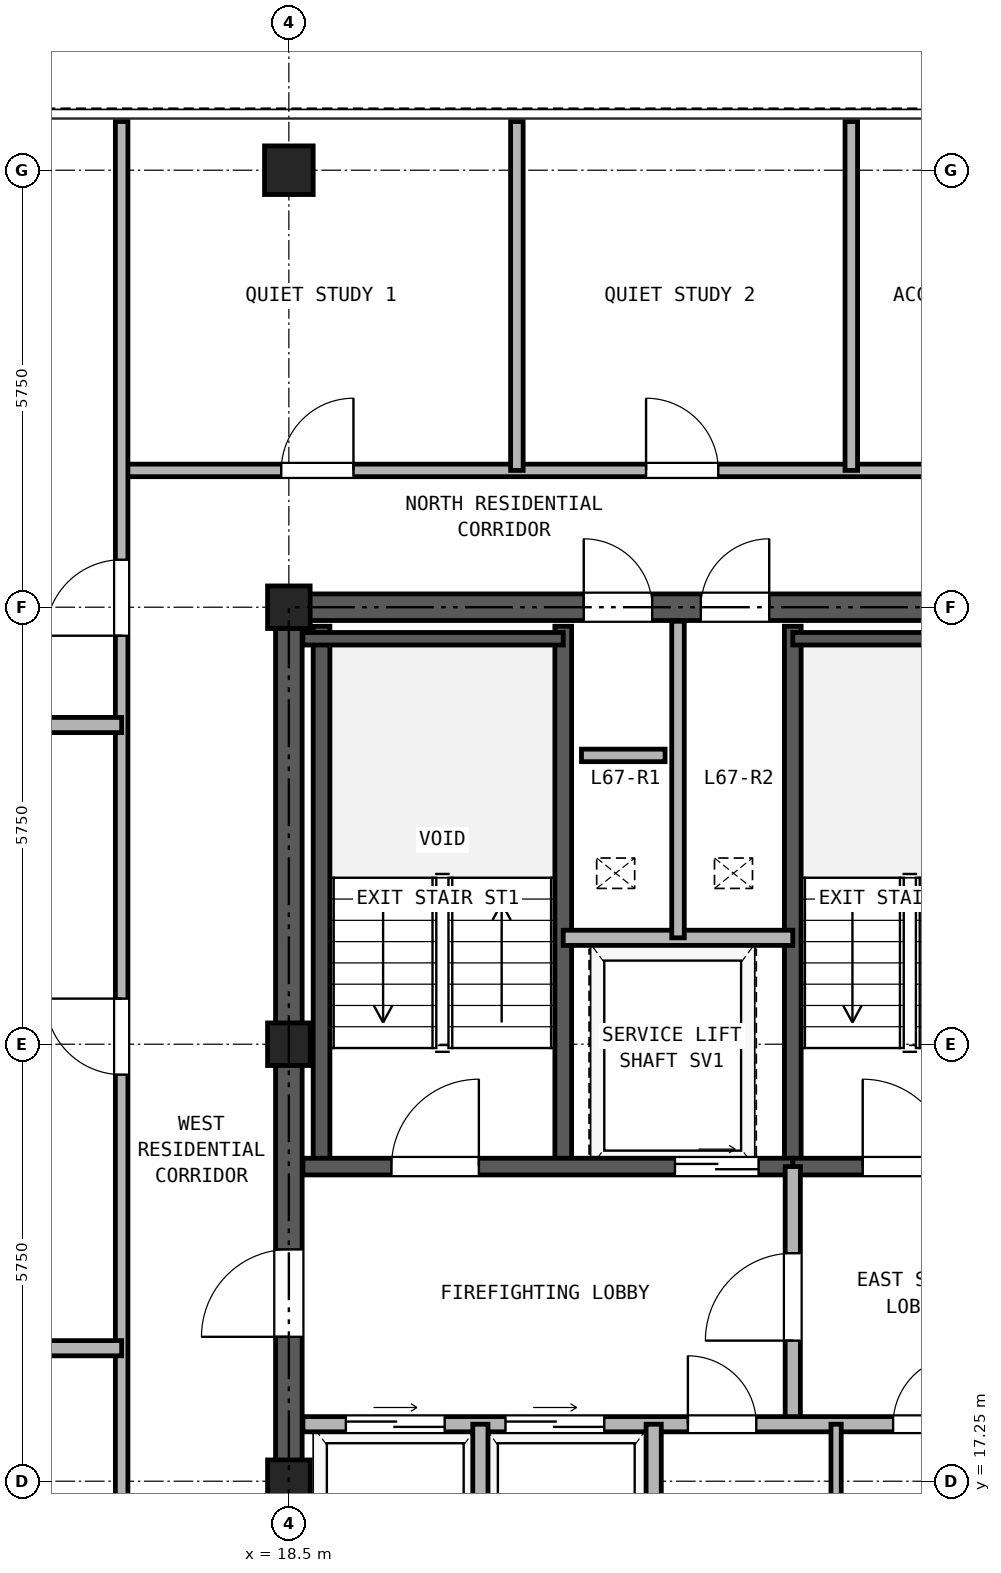
"""IFC4 building model, lengths in metres.
Left out: names, types, materials, properties, quantities, classifications, styles, units other than length and angle.
Written with IfcOpenShell. Run it as: python <this file> out.ifc"""

import sys

from ifc_helpers import new_model, si_unit, direction, frame, frame_2d, origin, origin_2d, place, context, subcontext, project, spatial, rectangle, hollow_rectangle, extrude, source, transform, mapped, element, fill, save


model = new_model("IFC4")
c1 = context("Model", 3, precision=1e-05, world=origin(), true_north=direction((0.0, 1.0)))
c2 = subcontext(c1, "Body", "Model", "MODEL_VIEW")
j1 = project(units=[si_unit("LENGTHUNIT", "METRE"), si_unit("PLANEANGLEUNIT", "RADIAN")], contexts=[c1])
p1 = place(None, origin())
s1 = spatial("IfcSite", under=j1, at=p1, CompositionType="ELEMENT")
p2 = place(p1, origin())
s2 = spatial("IfcBuilding", under=s1, at=p2, CompositionType="ELEMENT")
p3 = place(p2, frame((0.0, 0.0, 236.1)))
s3 = spatial("IfcBuildingStorey", under=s2, at=p3, CompositionType="ELEMENT", Elevation=236.1)
m1 = source(origin(), c2, "Body", "SweptSolid", [
    extrude(hollow_rectangle(XDim=0.64, YDim=0.64, WallThickness=0.035, at=origin_2d()), origin(), (0.0, 0.0, 1.0), 2.98),
])
p4 = place(p3, frame((18.5, 34.5, 0.0), z_axis=(0.0, 0.0, 1.0), x_axis=(1.0, 0.0, 0.0)))
e1 = element("IfcColumn", 1, at=p4, inside=s3, PredefinedType="COLUMN", context=c2, shape_type="MappedRepresentation", body=[
    mapped(m1, transform((0.0, 0.0, 0.0), x_axis=(1.0, 0.0, 0.0), y_axis=(0.0, 1.0, 0.0), z_axis=(0.0, 0.0, 1.0), scale=1.0)),
])
m2 = source(origin(), c2, "Body", "SweptSolid", [
    extrude(hollow_rectangle(XDim=0.56, YDim=0.56, WallThickness=0.03, at=origin_2d()), origin(), (0.0, 0.0, 1.0), 2.98),
])
for number, where, z_axis, x_axis in (
    (2, (18.5, 17.25, 0.0), (0.0, 0.0, 1.0), (1.0, 0.0, 0.0)),
    (3, (18.5, 23.0, 0.0), (0.0, 0.0, 1.0), (1.0, 0.0, 0.0)),
    (4, (18.5, 28.75, 0.0), (0.0, 0.0, 1.0), (1.0, 0.0, 0.0)),
):
    element("IfcColumn", number, at=place(p3, frame(where, z_axis=z_axis, x_axis=x_axis)), inside=s3, PredefinedType="COLUMN", context=c2, shape_type="MappedRepresentation", body=[
        mapped(m2, transform((0.0, 0.0, 0.0), x_axis=(1.0, 0.0, 0.0), y_axis=(0.0, 1.0, 0.0), z_axis=(0.0, 0.0, 1.0), scale=1.0)),
    ])
p5 = place(p3, frame((18.325, 28.75, 0.0), z_axis=(0.0, 0.0, 1.0), x_axis=(1.0, 0.0, 0.0)))
e5 = element("IfcWall", 5, at=p5, inside=s3, PredefinedType="SHEAR", context=c2, shape_type="SweptSolid", body=[
    extrude(rectangle(XDim=10.35, YDim=0.35, at=frame_2d((5.175, 0.0))), origin(), (0.0, 0.0, 1.0), 2.98),
])
p6 = place(p5, frame((4.055, 0.0, 0.0)))
e6 = element("IfcOpeningElement", 6, at=p6, cuts=e5, PredefinedType="OPENING", context=c2, shape_type="SweptSolid", body=[
    extrude(rectangle(XDim=0.9, YDim=2.05, at=frame_2d((0.45, 1.025))), frame((0.0, 0.185, 0.0), z_axis=(0.0, -1.0, 0.0), x_axis=(1.0, 0.0, 0.0)), (0.0, 0.0, 1.0), 0.37),
])
p7 = place(p5, frame((5.595, 0.0, 0.0)))
e7 = element("IfcOpeningElement", 7, at=p7, cuts=e5, PredefinedType="OPENING", context=c2, shape_type="SweptSolid", body=[
    extrude(rectangle(XDim=0.9, YDim=2.05, at=frame_2d((0.45, 1.025))), frame((0.0, 0.185, 0.0), z_axis=(0.0, -1.0, 0.0), x_axis=(1.0, 0.0, 0.0)), (0.0, 0.0, 1.0), 0.37),
])
p8 = place(p3, frame((18.5, 11.675, 0.0), z_axis=(0.0, 0.0, 1.0), x_axis=(0.0, 1.0, 0.0)))
e8 = element("IfcWall", 8, at=p8, inside=s3, PredefinedType="SHEAR", context=c2, shape_type="SweptSolid", body=[
    extrude(rectangle(XDim=16.9, YDim=0.35, at=frame_2d((8.45, 0.0))), origin(), (0.0, 0.0, 1.0), 2.98),
])
p9 = place(p8, frame((7.475, 0.0, 0.0)))
e9 = element("IfcOpeningElement", 9, at=p9, cuts=e8, PredefinedType="OPENING", context=c2, shape_type="SweptSolid", body=[
    extrude(rectangle(XDim=1.15, YDim=2.2, at=frame_2d((0.575, 1.1))), frame((0.0, 0.185, 0.0), z_axis=(0.0, -1.0, 0.0), x_axis=(1.0, 0.0, 0.0)), (0.0, 0.0, 1.0), 0.37),
])
for number, where, z_axis, x_axis in (
    (10, (18.93, 21.39, 0.0), (0.0, 0.0, 1.0), (0.0, 1.0, 0.0)),
    (11, (22.11, 21.39, 0.0), (0.0, 0.0, 1.0), (0.0, 1.0, 0.0)),
    (12, (25.13, 21.39, 0.0), (0.0, 0.0, 1.0), (0.0, 1.0, 0.0)),
):
    element("IfcWall", number, at=place(p3, frame(where, z_axis=z_axis, x_axis=x_axis)), inside=s3, PredefinedType="SOLIDWALL", context=c2, shape_type="SweptSolid", body=[
        extrude(rectangle(XDim=7.11, YDim=0.22, at=frame_2d((3.555, 0.0))), origin(), (0.0, 0.0, 1.0), 2.98),
    ])
p10 = place(p3, frame((18.685, 28.335, 0.0), z_axis=(0.0, 0.0, 1.0), x_axis=(1.0, 0.0, 0.0)))
e13 = element("IfcWall", 13, at=p10, inside=s3, PredefinedType="PARTITIONING", context=c2, shape_type="SweptSolid", body=[
    extrude(rectangle(XDim=3.425, YDim=0.165, at=frame_2d((1.712, 0.0))), origin(), (0.0, 0.0, 1.0), 2.98),
])
p11 = place(p3, frame((25.13, 28.335, 0.0), z_axis=(0.0, 0.0, 1.0), x_axis=(1.0, 0.0, 0.0)))
e14 = element("IfcWall", 14, at=p11, inside=s3, PredefinedType="PARTITIONING", context=c2, shape_type="SweptSolid", body=[
    extrude(rectangle(XDim=3.185, YDim=0.165, at=frame_2d((1.593, 0.0))), origin(), (0.0, 0.0, 1.0), 2.98),
])
p12 = place(p3, frame((18.685, 21.39, 0.0), z_axis=(0.0, 0.0, 1.0), x_axis=(1.0, 0.0, 0.0)))
e15 = element("IfcWall", 15, at=p12, inside=s3, PredefinedType="SOLIDWALL", context=c2, shape_type="SweptSolid", body=[
    extrude(rectangle(XDim=6.445, YDim=0.22, at=frame_2d((3.222, 0.0))), origin(), (0.0, 0.0, 1.0), 2.98),
])
p13 = place(p12, frame((1.165, 0.0, 0.0)))
e16 = element("IfcOpeningElement", 16, at=p13, cuts=e15, PredefinedType="OPENING", context=c2, shape_type="SweptSolid", body=[
    extrude(rectangle(XDim=1.15, YDim=2.2, at=frame_2d((0.575, 1.1))), frame((0.0, 0.12, 0.0), z_axis=(0.0, -1.0, 0.0), x_axis=(1.0, 0.0, 0.0)), (0.0, 0.0, 1.0), 0.24),
])
p14 = place(p12, frame((4.895, 0.0, 0.0)))
e17 = element("IfcOpeningElement", 17, at=p14, cuts=e15, PredefinedType="OPENING", context=c2, shape_type="SweptSolid", body=[
    extrude(rectangle(XDim=1.1, YDim=2.25, at=frame_2d((0.55, 1.125))), frame((0.0, 0.12, 0.0), z_axis=(0.0, -1.0, 0.0), x_axis=(1.0, 0.0, 0.0)), (0.0, 0.0, 1.0), 0.24),
])
p15 = place(p3, frame((25.13, 21.39, 0.0), z_axis=(0.0, 0.0, 1.0), x_axis=(1.0, 0.0, 0.0)))
e18 = element("IfcWall", 18, at=p15, inside=s3, PredefinedType="SOLIDWALL", context=c2, shape_type="SweptSolid", body=[
    extrude(rectangle(XDim=3.185, YDim=0.22, at=frame_2d((1.593, 0.0))), origin(), (0.0, 0.0, 1.0), 2.98),
])
p16 = place(p15, frame((0.92, 0.0, 0.0)))
e19 = element("IfcOpeningElement", 19, at=p16, cuts=e18, PredefinedType="OPENING", context=c2, shape_type="SweptSolid", body=[
    extrude(rectangle(XDim=1.15, YDim=2.2, at=frame_2d((0.575, 1.1))), frame((0.0, 0.12, 0.0), z_axis=(0.0, -1.0, 0.0), x_axis=(1.0, 0.0, 0.0)), (0.0, 0.0, 1.0), 0.24),
])
p17 = place(p3, frame((22.11, 24.4, 0.0), z_axis=(0.0, 0.0, 1.0), x_axis=(1.0, 0.0, 0.0)))
e20 = element("IfcWall", 20, at=p17, inside=s3, PredefinedType="PARTITIONING", context=c2, shape_type="SweptSolid", body=[
    extrude(rectangle(XDim=3.02, YDim=0.2, at=frame_2d((1.51, 0.0))), origin(), (0.0, 0.0, 1.0), 2.98),
])
p18 = place(p3, frame((23.62, 24.4, 0.0), z_axis=(0.0, 0.0, 1.0), x_axis=(0.0, 1.0, 0.0)))
e21 = element("IfcWall", 21, at=p18, inside=s3, PredefinedType="PARTITIONING", context=c2, shape_type="SweptSolid", body=[
    extrude(rectangle(XDim=4.165, YDim=0.165, at=frame_2d((2.083, 0.0))), origin(), (0.0, 0.0, 1.0), 2.98),
])
p19 = place(p3, frame((25.13, 18.0, 0.0), z_axis=(0.0, 0.0, 1.0), x_axis=(0.0, 1.0, 0.0)))
e22 = element("IfcWall", 22, at=p19, inside=s3, PredefinedType="PARTITIONING", context=c2, shape_type="SweptSolid", body=[
    extrude(rectangle(XDim=3.39, YDim=0.2, at=frame_2d((1.695, 0.0))), origin(), (0.0, 0.0, 1.0), 2.98),
])
p20 = place(p19, frame((1.1, 0.0, 0.0)))
e23 = element("IfcOpeningElement", 23, at=p20, cuts=e22, PredefinedType="OPENING", context=c2, shape_type="SweptSolid", body=[
    extrude(rectangle(XDim=1.15, YDim=2.2, at=frame_2d((0.575, 1.1))), frame((0.0, 0.11, 0.0), z_axis=(0.0, -1.0, 0.0), x_axis=(1.0, 0.0, 0.0)), (0.0, 0.0, 1.0), 0.22),
])
p21 = place(p3, frame((18.685, 18.0, 0.0), z_axis=(0.0, 0.0, 1.0), x_axis=(1.0, 0.0, 0.0)))
e24 = element("IfcWall", 24, at=p21, inside=s3, PredefinedType="PARTITIONING", context=c2, shape_type="SweptSolid", body=[
    extrude(rectangle(XDim=9.63, YDim=0.2, at=frame_2d((4.815, 0.0))), origin(), (0.0, 0.0, 1.0), 2.98),
])
p22 = place(p21, frame((0.565, 0.0, 0.0)))
e25 = element("IfcOpeningElement", 25, at=p22, cuts=e24, PredefinedType="OPENING", context=c2, shape_type="SweptSolid", body=[
    extrude(rectangle(XDim=1.3, YDim=2.3, at=frame_2d((0.65, 1.15))), frame((0.0, 0.11, 0.0), z_axis=(0.0, -1.0, 0.0), x_axis=(1.0, 0.0, 0.0)), (0.0, 0.0, 1.0), 0.22),
])
p23 = place(p21, frame((2.665, 0.0, 0.0)))
e26 = element("IfcOpeningElement", 26, at=p23, cuts=e24, PredefinedType="OPENING", context=c2, shape_type="SweptSolid", body=[
    extrude(rectangle(XDim=1.3, YDim=2.3, at=frame_2d((0.65, 1.15))), frame((0.0, 0.11, 0.0), z_axis=(0.0, -1.0, 0.0), x_axis=(1.0, 0.0, 0.0)), (0.0, 0.0, 1.0), 0.22),
])
p24 = place(p21, frame((5.065, 0.0, 0.0)))
e27 = element("IfcOpeningElement", 27, at=p24, cuts=e24, PredefinedType="OPENING", context=c2, shape_type="SweptSolid", body=[
    extrude(rectangle(XDim=0.9, YDim=2.05, at=frame_2d((0.45, 1.025))), frame((0.0, 0.11, 0.0), z_axis=(0.0, -1.0, 0.0), x_axis=(1.0, 0.0, 0.0)), (0.0, 0.0, 1.0), 0.22),
])
p25 = place(p21, frame((7.765, 0.0, 0.0)))
e28 = element("IfcOpeningElement", 28, at=p25, cuts=e24, PredefinedType="OPENING", context=c2, shape_type="SweptSolid", body=[
    extrude(rectangle(XDim=0.9, YDim=2.05, at=frame_2d((0.45, 1.025))), frame((0.0, 0.11, 0.0), z_axis=(0.0, -1.0, 0.0), x_axis=(1.0, 0.0, 0.0)), (0.0, 0.0, 1.0), 0.22),
])
for number, where, z_axis, x_axis in (
    (29, (21.02, 15.0, 0.0), (0.0, 0.0, 1.0), (0.0, 1.0, 0.0)),
    (30, (23.3, 15.0, 0.0), (0.0, 0.0, 1.0), (0.0, 1.0, 0.0)),
):
    element("IfcWall", number, at=place(p3, frame(where, z_axis=z_axis, x_axis=x_axis)), inside=s3, PredefinedType="PARTITIONING", context=c2, shape_type="SweptSolid", body=[
        extrude(rectangle(XDim=3.0, YDim=0.2, at=frame_2d((1.5, 0.0))), origin(), (0.0, 0.0, 1.0), 2.98),
    ])
p26 = place(p3, frame((25.7, 15.0, 0.0), z_axis=(0.0, 0.0, 1.0), x_axis=(0.0, 1.0, 0.0)))
e31 = element("IfcWall", 31, at=p26, inside=s3, PredefinedType="PARTITIONING", context=c2, shape_type="SweptSolid", body=[
    extrude(rectangle(XDim=3.0, YDim=0.135, at=frame_2d((1.5, 0.0))), origin(), (0.0, 0.0, 1.0), 2.98),
])
p27 = place(p3, frame((16.3, 30.55, 0.0), z_axis=(0.0, 0.0, 1.0), x_axis=(1.0, 0.0, 0.0)))
e32 = element("IfcWall", 32, at=p27, inside=s3, PredefinedType="PARTITIONING", context=c2, shape_type="SweptSolid", body=[
    extrude(rectangle(XDim=14.4, YDim=0.165, at=frame_2d((7.2, 0.0))), origin(), (0.0, 0.0, 1.0), 2.98),
])
p28 = place(p27, frame((2.1, 0.0, 0.0)))
e33 = element("IfcOpeningElement", 33, at=p28, cuts=e32, PredefinedType="OPENING", context=c2, shape_type="SweptSolid", body=[
    extrude(rectangle(XDim=0.95, YDim=2.15, at=frame_2d((0.475, 1.075))), frame((0.0, 0.093, 0.0), z_axis=(0.0, -1.0, 0.0), x_axis=(1.0, 0.0, 0.0)), (0.0, 0.0, 1.0), 0.185),
])
p29 = place(p27, frame((6.9, 0.0, 0.0)))
e34 = element("IfcOpeningElement", 34, at=p29, cuts=e32, PredefinedType="OPENING", context=c2, shape_type="SweptSolid", body=[
    extrude(rectangle(XDim=0.95, YDim=2.15, at=frame_2d((0.475, 1.075))), frame((0.0, 0.093, 0.0), z_axis=(0.0, -1.0, 0.0), x_axis=(1.0, 0.0, 0.0)), (0.0, 0.0, 1.0), 0.185),
])
p30 = place(p27, frame((11.5, 0.0, 0.0)))
e35 = element("IfcOpeningElement", 35, at=p30, cuts=e32, PredefinedType="OPENING", context=c2, shape_type="SweptSolid", body=[
    extrude(rectangle(XDim=0.92, YDim=2.1, at=frame_2d((0.46, 1.05))), frame((0.0, 0.093, 0.0), z_axis=(0.0, -1.0, 0.0), x_axis=(1.0, 0.0, 0.0)), (0.0, 0.0, 1.0), 0.185),
])
p31 = place(p3, frame((16.3, 11.45, 0.0), z_axis=(0.0, 0.0, 1.0), x_axis=(0.0, 1.0, 0.0)))
e36 = element("IfcWall", 36, at=p31, inside=s3, PredefinedType="PARTITIONING", context=c2, shape_type="SweptSolid", body=[
    extrude(rectangle(XDim=23.69, YDim=0.165, at=frame_2d((11.845, 0.0))), origin(), (0.0, 0.0, 1.0), 2.98),
])
p32 = place(p31, frame((3.275, 0.0, 0.0)))
e37 = element("IfcOpeningElement", 37, at=p32, cuts=e36, PredefinedType="OPENING", context=c2, shape_type="SweptSolid", body=[
    extrude(rectangle(XDim=1.0, YDim=2.15, at=frame_2d((0.5, 1.075))), frame((0.0, 0.093, 0.0), z_axis=(0.0, -1.0, 0.0), x_axis=(1.0, 0.0, 0.0)), (0.0, 0.0, 1.0), 0.185),
])
p33 = place(p31, frame((11.15, 0.0, 0.0)))
e38 = element("IfcOpeningElement", 38, at=p33, cuts=e36, PredefinedType="OPENING", context=c2, shape_type="SweptSolid", body=[
    extrude(rectangle(XDim=1.0, YDim=2.15, at=frame_2d((0.5, 1.075))), frame((0.0, 0.093, 0.0), z_axis=(0.0, -1.0, 0.0), x_axis=(1.0, 0.0, 0.0)), (0.0, 0.0, 1.0), 0.185),
])
p34 = place(p31, frame((16.925, 0.0, 0.0)))
e39 = element("IfcOpeningElement", 39, at=p34, cuts=e36, PredefinedType="OPENING", context=c2, shape_type="SweptSolid", body=[
    extrude(rectangle(XDim=1.0, YDim=2.15, at=frame_2d((0.5, 1.075))), frame((0.0, 0.093, 0.0), z_axis=(0.0, -1.0, 0.0), x_axis=(1.0, 0.0, 0.0)), (0.0, 0.0, 1.0), 0.185),
])
for number, where, z_axis, x_axis in (
    (40, (5.36, 19.0, 0.0), (0.0, 0.0, 1.0), (1.0, 0.0, 0.0)),
    (41, (5.36, 27.2, 0.0), (0.0, 0.0, 1.0), (1.0, 0.0, 0.0)),
):
    element("IfcWall", number, at=place(p3, frame(where, z_axis=z_axis, x_axis=x_axis)), inside=s3, PredefinedType="PARTITIONING", context=c2, shape_type="SweptSolid", body=[
        extrude(rectangle(XDim=10.94, YDim=0.2, at=frame_2d((5.47, 0.0))), origin(), (0.0, 0.0, 1.0), 2.98),
    ])
for number, where, z_axis, x_axis in (
    (42, (21.5, 30.55, 0.0), (0.0, 0.0, 1.0), (0.0, 1.0, 0.0)),
    (43, (25.9, 30.55, 0.0), (0.0, 0.0, 1.0), (0.0, 1.0, 0.0)),
):
    element("IfcWall", number, at=place(p3, frame(where, z_axis=z_axis, x_axis=x_axis)), inside=s3, PredefinedType="PARTITIONING", context=c2, shape_type="SweptSolid", body=[
        extrude(rectangle(XDim=4.59, YDim=0.165, at=frame_2d((2.295, 0.0))), origin(), (0.0, 0.0, 1.0), 2.98),
    ])
p35 = place(p3, frame((22.35, 26.8, 0.0), z_axis=(0.0, 0.0, 1.0), x_axis=(1.0, 0.0, 0.0)))
e44 = element("IfcWall", 44, at=p35, inside=s3, PredefinedType="PARTITIONING", context=c2, shape_type="SweptSolid", body=[
    extrude(rectangle(XDim=1.1, YDim=0.165, at=frame_2d((0.55, 0.0))), origin(), (0.0, 0.0, 1.0), 2.98),
])
p36 = place(p13, frame((1.15, 0.0, 0.0), z_axis=(0.0, 0.0, 1.0), x_axis=(-1.0, 0.0, 0.0)))
e45 = element("IfcDoor", 45, at=p36, inside=s3, OperationType="SINGLE_SWING_RIGHT", PredefinedType="DOOR", context=c2, shape_type="SweptSolid", body=[
    extrude(rectangle(XDim=1.15, YDim=2.2, at=frame_2d((0.575, 1.1))), frame((0.0, 0.025, 0.0), z_axis=(0.0, -1.0, 0.0), x_axis=(1.0, 0.0, 0.0)), (0.0, 0.0, 1.0), 0.05),
])
fill(e16, e45)
p37 = place(p16, frame((1.15, 0.0, 0.0), z_axis=(0.0, 0.0, 1.0), x_axis=(-1.0, 0.0, 0.0)))
e46 = element("IfcDoor", 46, at=p37, inside=s3, OperationType="SINGLE_SWING_LEFT", PredefinedType="DOOR", context=c2, shape_type="SweptSolid", body=[
    extrude(rectangle(XDim=1.15, YDim=2.2, at=frame_2d((0.575, 1.1))), frame((0.0, 0.025, 0.0), z_axis=(0.0, -1.0, 0.0), x_axis=(1.0, 0.0, 0.0)), (0.0, 0.0, 1.0), 0.05),
])
fill(e19, e46)
p38 = place(p14, frame((1.1, 0.0, 0.0), z_axis=(0.0, 0.0, 1.0), x_axis=(-1.0, 0.0, 0.0)))
e47 = element("IfcDoor", 47, at=p38, inside=s3, OperationType="DOUBLE_DOOR_SLIDING", PredefinedType="DOOR", context=c2, shape_type="SweptSolid", body=[
    extrude(rectangle(XDim=1.1, YDim=2.25, at=frame_2d((0.55, 1.125))), frame((0.0, 0.025, 0.0), z_axis=(0.0, -1.0, 0.0), x_axis=(1.0, 0.0, 0.0)), (0.0, 0.0, 1.0), 0.05),
])
fill(e17, e47)
p39 = place(p20, origin())
e48 = element("IfcDoor", 48, at=p39, inside=s3, OperationType="SINGLE_SWING_LEFT", PredefinedType="DOOR", context=c2, shape_type="SweptSolid", body=[
    extrude(rectangle(XDim=1.15, YDim=2.2, at=frame_2d((0.575, 1.1))), frame((0.0, 0.025, 0.0), z_axis=(0.0, -1.0, 0.0), x_axis=(1.0, 0.0, 0.0)), (0.0, 0.0, 1.0), 0.05),
])
fill(e23, e48)
p40 = place(p22, origin())
e49 = element("IfcDoor", 49, at=p40, inside=s3, OperationType="DOUBLE_DOOR_SLIDING", PredefinedType="DOOR", context=c2, shape_type="SweptSolid", body=[
    extrude(rectangle(XDim=1.3, YDim=2.3, at=frame_2d((0.65, 1.15))), frame((0.0, 0.025, 0.0), z_axis=(0.0, -1.0, 0.0), x_axis=(1.0, 0.0, 0.0)), (0.0, 0.0, 1.0), 0.05),
])
fill(e25, e49)
p41 = place(p23, origin())
e50 = element("IfcDoor", 50, at=p41, inside=s3, OperationType="DOUBLE_DOOR_SLIDING", PredefinedType="DOOR", context=c2, shape_type="SweptSolid", body=[
    extrude(rectangle(XDim=1.3, YDim=2.3, at=frame_2d((0.65, 1.15))), frame((0.0, 0.025, 0.0), z_axis=(0.0, -1.0, 0.0), x_axis=(1.0, 0.0, 0.0)), (0.0, 0.0, 1.0), 0.05),
])
fill(e26, e50)
p42 = place(p24, frame((0.9, 0.0, 0.0), z_axis=(0.0, 0.0, 1.0), x_axis=(-1.0, 0.0, 0.0)))
e51 = element("IfcDoor", 51, at=p42, inside=s3, OperationType="SINGLE_SWING_LEFT", PredefinedType="DOOR", context=c2, shape_type="SweptSolid", body=[
    extrude(rectangle(XDim=0.9, YDim=2.05, at=frame_2d((0.45, 1.025))), frame((0.0, 0.025, 0.0), z_axis=(0.0, -1.0, 0.0), x_axis=(1.0, 0.0, 0.0)), (0.0, 0.0, 1.0), 0.05),
])
fill(e27, e51)
p43 = place(p25, frame((0.9, 0.0, 0.0), z_axis=(0.0, 0.0, 1.0), x_axis=(-1.0, 0.0, 0.0)))
e52 = element("IfcDoor", 52, at=p43, inside=s3, OperationType="SINGLE_SWING_RIGHT", PredefinedType="DOOR", context=c2, shape_type="SweptSolid", body=[
    extrude(rectangle(XDim=0.9, YDim=2.05, at=frame_2d((0.45, 1.025))), frame((0.0, 0.025, 0.0), z_axis=(0.0, -1.0, 0.0), x_axis=(1.0, 0.0, 0.0)), (0.0, 0.0, 1.0), 0.05),
])
fill(e28, e52)
p44 = place(p9, frame((1.15, 0.0, 0.0), z_axis=(0.0, 0.0, 1.0), x_axis=(-1.0, 0.0, 0.0)))
e53 = element("IfcDoor", 53, at=p44, inside=s3, OperationType="SINGLE_SWING_LEFT", PredefinedType="DOOR", context=c2, shape_type="SweptSolid", body=[
    extrude(rectangle(XDim=1.15, YDim=2.2, at=frame_2d((0.575, 1.1))), frame((0.0, 0.025, 0.0), z_axis=(0.0, -1.0, 0.0), x_axis=(1.0, 0.0, 0.0)), (0.0, 0.0, 1.0), 0.05),
])
fill(e9, e53)
p45 = place(p6, origin())
e54 = element("IfcDoor", 54, at=p45, inside=s3, OperationType="SINGLE_SWING_LEFT", PredefinedType="DOOR", context=c2, shape_type="SweptSolid", body=[
    extrude(rectangle(XDim=0.9, YDim=2.05, at=frame_2d((0.45, 1.025))), frame((0.0, 0.025, 0.0), z_axis=(0.0, -1.0, 0.0), x_axis=(1.0, 0.0, 0.0)), (0.0, 0.0, 1.0), 0.05),
])
fill(e6, e54)
p46 = place(p7, origin())
e55 = element("IfcDoor", 55, at=p46, inside=s3, OperationType="SINGLE_SWING_RIGHT", PredefinedType="DOOR", context=c2, shape_type="SweptSolid", body=[
    extrude(rectangle(XDim=0.9, YDim=2.05, at=frame_2d((0.45, 1.025))), frame((0.0, 0.025, 0.0), z_axis=(0.0, -1.0, 0.0), x_axis=(1.0, 0.0, 0.0)), (0.0, 0.0, 1.0), 0.05),
])
fill(e7, e55)
p47 = place(p33, origin())
e56 = element("IfcDoor", 56, at=p47, inside=s3, OperationType="SINGLE_SWING_RIGHT", PredefinedType="DOOR", context=c2, shape_type="SweptSolid", body=[
    extrude(rectangle(XDim=1.0, YDim=2.15, at=frame_2d((0.5, 1.075))), frame((0.0, 0.025, 0.0), z_axis=(0.0, -1.0, 0.0), x_axis=(1.0, 0.0, 0.0)), (0.0, 0.0, 1.0), 0.05),
])
fill(e38, e56)
p48 = place(p34, origin())
e57 = element("IfcDoor", 57, at=p48, inside=s3, OperationType="SINGLE_SWING_LEFT", PredefinedType="DOOR", context=c2, shape_type="SweptSolid", body=[
    extrude(rectangle(XDim=1.0, YDim=2.15, at=frame_2d((0.5, 1.075))), frame((0.0, 0.025, 0.0), z_axis=(0.0, -1.0, 0.0), x_axis=(1.0, 0.0, 0.0)), (0.0, 0.0, 1.0), 0.05),
])
fill(e39, e57)
p49 = place(p28, origin())
e58 = element("IfcDoor", 58, at=p49, inside=s3, OperationType="SINGLE_SWING_RIGHT", PredefinedType="DOOR", context=c2, shape_type="SweptSolid", body=[
    extrude(rectangle(XDim=0.95, YDim=2.15, at=frame_2d((0.475, 1.075))), frame((0.0, 0.025, 0.0), z_axis=(0.0, -1.0, 0.0), x_axis=(1.0, 0.0, 0.0)), (0.0, 0.0, 1.0), 0.05),
])
fill(e33, e58)
p50 = place(p29, origin())
e59 = element("IfcDoor", 59, at=p50, inside=s3, OperationType="SINGLE_SWING_LEFT", PredefinedType="DOOR", context=c2, shape_type="SweptSolid", body=[
    extrude(rectangle(XDim=0.95, YDim=2.15, at=frame_2d((0.475, 1.075))), frame((0.0, 0.025, 0.0), z_axis=(0.0, -1.0, 0.0), x_axis=(1.0, 0.0, 0.0)), (0.0, 0.0, 1.0), 0.05),
])
fill(e34, e59)
save(model, sys.argv[1])
